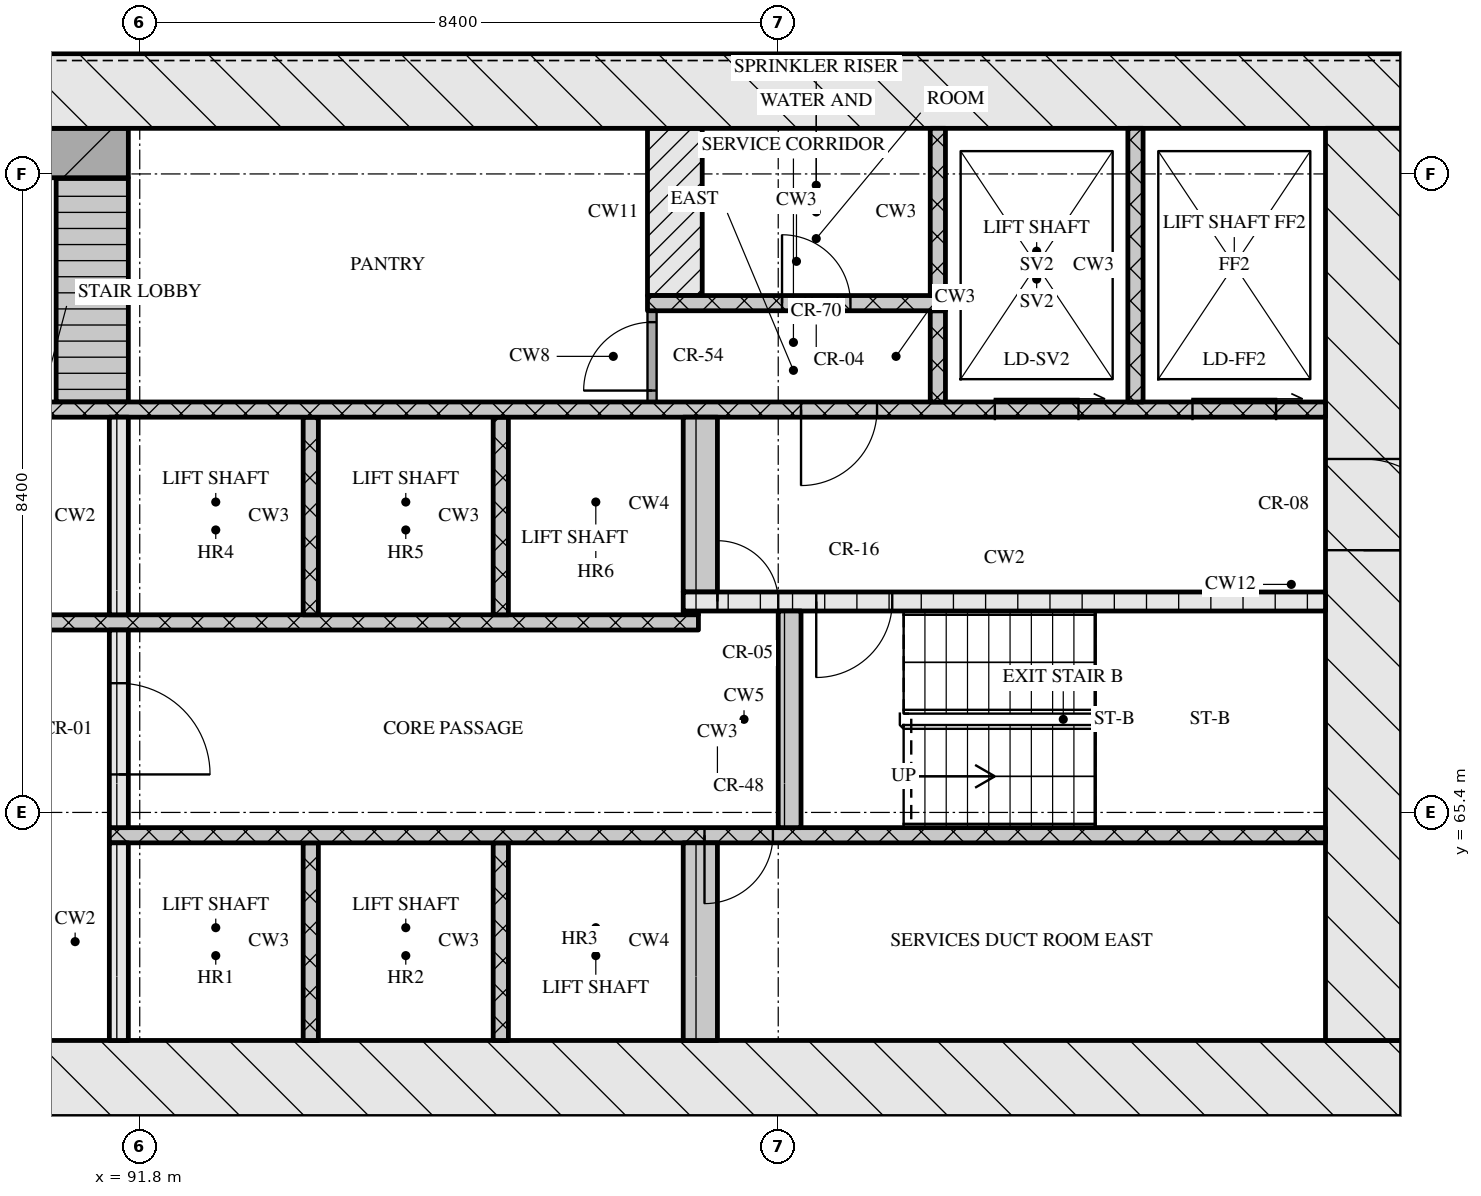
"""IFC4 building model, lengths in metres.
Left out: names, types, materials, properties, quantities, classifications, styles, units other than length and angle.
Written with IfcOpenShell. Run it as: python <this file> out.ifc"""

import sys

from ifc_helpers import new_model, si_unit, direction, frame, frame_2d, origin, place, context, subcontext, project, spatial, rectangle, extrude, element, fill, save


model = new_model("IFC4")
c1 = context("Model", 3, precision=1e-05, world=origin(), true_north=direction((0.0, 1.0)))
c2 = subcontext(c1, "Body", "Model", "MODEL_VIEW")
j1 = project(units=[si_unit("LENGTHUNIT", "METRE"), si_unit("PLANEANGLEUNIT", "RADIAN")], contexts=[c1])
p1 = place(None, origin())
s1 = spatial("IfcSite", under=j1, at=p1, CompositionType="ELEMENT")
p2 = place(p1, origin())
s2 = spatial("IfcBuilding", under=s1, at=p2, CompositionType="ELEMENT")
p3 = place(p2, frame((0.0, 0.0, 131.25)))
s3 = spatial("IfcBuildingStorey", under=s2, at=p3, CompositionType="ELEMENT", Elevation=131.25)
p4 = place(p3, frame((66.8, 61.9, 0.0), z_axis=(0.0, 0.0, 1.0), x_axis=(1.0, 0.0, 0.0)))
e1 = element("IfcWall", 1, at=p4, inside=s3, PredefinedType="SOLIDWALL", context=c2, shape_type="SweptSolid", body=[
    extrude(rectangle(XDim=41.6, YDim=1.0, at=frame_2d((20.8, 0.0))), origin(), (0.0, 0.0, 1.0), 3.32),
])
p5 = place(p4, frame((21.15, 0.0, 0.0)))
e2 = element("IfcOpeningElement", 2, at=p5, cuts=e1, PredefinedType="OPENING", context=c2, shape_type="SweptSolid", body=[
    extrude(rectangle(XDim=1.8, YDim=2.1, at=frame_2d((0.9, 1.05))), frame((0.0, 0.51, 0.0), z_axis=(0.0, -1.0, 0.0), x_axis=(1.0, 0.0, 0.0)), (0.0, 0.0, 1.0), 1.02),
])
p6 = place(p3, frame((66.8, 74.9, 0.0), z_axis=(0.0, 0.0, 1.0), x_axis=(1.0, 0.0, 0.0)))
e3 = element("IfcWall", 3, at=p6, inside=s3, PredefinedType="SOLIDWALL", context=c2, shape_type="SweptSolid", body=[
    extrude(rectangle(XDim=41.6, YDim=1.0, at=frame_2d((20.8, 0.0))), origin(), (0.0, 0.0, 1.0), 3.32),
])
p7 = place(p3, frame((107.9, 62.4, 0.0), z_axis=(0.0, 0.0, 1.0), x_axis=(0.0, 1.0, 0.0)))
e4 = element("IfcWall", 4, at=p7, inside=s3, PredefinedType="SOLIDWALL", context=c2, shape_type="SweptSolid", body=[
    extrude(rectangle(XDim=12.0, YDim=1.0, at=frame_2d((6.0, 0.0))), origin(), (0.0, 0.0, 1.0), 3.32),
])
p8 = place(p7, frame((6.45, 0.0, 0.0)))
e5 = element("IfcOpeningElement", 5, at=p8, cuts=e4, PredefinedType="OPENING", context=c2, shape_type="SweptSolid", body=[
    extrude(rectangle(XDim=1.2, YDim=2.1, at=frame_2d((0.6, 1.05))), frame((0.0, 0.51, 0.0), z_axis=(0.0, -1.0, 0.0), x_axis=(1.0, 0.0, 0.0)), (0.0, 0.0, 1.0), 1.02),
])
p9 = place(p3, frame((91.525, 62.4, 0.0), z_axis=(0.0, 0.0, 1.0), x_axis=(0.0, 1.0, 0.0)))
e6 = element("IfcWall", 6, at=p9, inside=s3, PredefinedType="SOLIDWALL", context=c2, shape_type="SweptSolid", body=[
    extrude(rectangle(XDim=2.6, YDim=0.25, at=frame_2d((1.3, 0.0))), origin(), (0.0, 0.0, 1.0), 3.32),
])
for number, where, z_axis, x_axis in (
    (7, (94.05, 62.4, 0.0), (0.0, 0.0, 1.0), (0.0, 1.0, 0.0)),
    (8, (96.55, 62.4, 0.0), (0.0, 0.0, 1.0), (0.0, 1.0, 0.0)),
):
    element("IfcWall", number, at=place(p3, frame(where, z_axis=z_axis, x_axis=x_axis)), inside=s3, PredefinedType="SOLIDWALL", context=c2, shape_type="SweptSolid", body=[
        extrude(rectangle(XDim=2.6, YDim=0.2, at=frame_2d((1.3, 0.0))), origin(), (0.0, 0.0, 1.0), 3.32),
    ])
p10 = place(p3, frame((99.175, 62.4, 0.0), z_axis=(0.0, 0.0, 1.0), x_axis=(0.0, 1.0, 0.0)))
e9 = element("IfcWall", 9, at=p10, inside=s3, PredefinedType="SOLIDWALL", context=c2, shape_type="SweptSolid", body=[
    extrude(rectangle(XDim=2.6, YDim=0.45, at=frame_2d((1.3, 0.0))), origin(), (0.0, 0.0, 1.0), 3.32),
])
p11 = place(p3, frame((91.4, 65.1, 0.0), z_axis=(0.0, 0.0, 1.0), x_axis=(1.0, 0.0, 0.0)))
e10 = element("IfcWall", 10, at=p11, inside=s3, PredefinedType="SOLIDWALL", context=c2, shape_type="SweptSolid", body=[
    extrude(rectangle(XDim=16.0, YDim=0.2, at=frame_2d((8.0, 0.0))), origin(), (0.0, 0.0, 1.0), 3.32),
])
p12 = place(p11, frame((7.83, 0.0, 0.0)))
e11 = element("IfcOpeningElement", 11, at=p12, cuts=e10, PredefinedType="OPENING", context=c2, shape_type="SweptSolid", body=[
    extrude(rectangle(XDim=0.9, YDim=2.1, at=frame_2d((0.45, 1.05))), frame((0.0, 0.11, 0.0), z_axis=(0.0, -1.0, 0.0), x_axis=(1.0, 0.0, 0.0)), (0.0, 0.0, 1.0), 0.22),
])
p13 = place(p3, frame((91.525, 65.2, 0.0), z_axis=(0.0, 0.0, 1.0), x_axis=(0.0, 1.0, 0.0)))
e12 = element("IfcWall", 12, at=p13, inside=s3, PredefinedType="SOLIDWALL", context=c2, shape_type="SweptSolid", body=[
    extrude(rectangle(XDim=2.6, YDim=0.25, at=frame_2d((1.3, 0.0))), origin(), (0.0, 0.0, 1.0), 3.32),
])
p14 = place(p13, frame((0.7, 0.0, 0.0)))
e13 = element("IfcOpeningElement", 13, at=p14, cuts=e12, PredefinedType="OPENING", context=c2, shape_type="SweptSolid", body=[
    extrude(rectangle(XDim=1.2, YDim=2.1, at=frame_2d((0.6, 1.05))), frame((0.0, 0.135, 0.0), z_axis=(0.0, -1.0, 0.0), x_axis=(1.0, 0.0, 0.0)), (0.0, 0.0, 1.0), 0.27),
])
p15 = place(p3, frame((100.35, 65.2, 0.0), z_axis=(0.0, 0.0, 1.0), x_axis=(0.0, 1.0, 0.0)))
e14 = element("IfcWall", 14, at=p15, inside=s3, PredefinedType="SOLIDWALL", context=c2, shape_type="SweptSolid", body=[
    extrude(rectangle(XDim=2.85, YDim=0.3, at=frame_2d((1.425, 0.0))), origin(), (0.0, 0.0, 1.0), 3.32),
])
p16 = place(p3, frame((76.05, 67.9, 0.0), z_axis=(0.0, 0.0, 1.0), x_axis=(1.0, 0.0, 0.0)))
e15 = element("IfcWall", 15, at=p16, inside=s3, PredefinedType="SOLIDWALL", context=c2, shape_type="SweptSolid", body=[
    extrude(rectangle(XDim=23.1, YDim=0.2, at=frame_2d((11.55, 0.0))), origin(), (0.0, 0.0, 1.0), 3.32),
])
p17 = place(p16, frame((0.6, 0.0, 0.0)))
e16 = element("IfcOpeningElement", 16, at=p17, cuts=e15, PredefinedType="OPENING", context=c2, shape_type="SweptSolid", body=[
    extrude(rectangle(XDim=1.1, YDim=2.1, at=frame_2d((0.55, 1.05))), frame((0.0, 0.11, 0.0), z_axis=(0.0, -1.0, 0.0), x_axis=(1.0, 0.0, 0.0)), (0.0, 0.0, 1.0), 0.22),
])
p18 = place(p16, frame((3.1, 0.0, 0.0)))
e17 = element("IfcOpeningElement", 17, at=p18, cuts=e15, PredefinedType="OPENING", context=c2, shape_type="SweptSolid", body=[
    extrude(rectangle(XDim=1.1, YDim=2.1, at=frame_2d((0.55, 1.05))), frame((0.0, 0.11, 0.0), z_axis=(0.0, -1.0, 0.0), x_axis=(1.0, 0.0, 0.0)), (0.0, 0.0, 1.0), 0.22),
])
p19 = place(p16, frame((5.6, 0.0, 0.0)))
e18 = element("IfcOpeningElement", 18, at=p19, cuts=e15, PredefinedType="OPENING", context=c2, shape_type="SweptSolid", body=[
    extrude(rectangle(XDim=1.1, YDim=2.1, at=frame_2d((0.55, 1.05))), frame((0.0, 0.11, 0.0), z_axis=(0.0, -1.0, 0.0), x_axis=(1.0, 0.0, 0.0)), (0.0, 0.0, 1.0), 0.22),
])
p20 = place(p16, frame((8.45, 0.0, 0.0)))
e19 = element("IfcOpeningElement", 19, at=p20, cuts=e15, PredefinedType="OPENING", context=c2, shape_type="SweptSolid", body=[
    extrude(rectangle(XDim=0.9, YDim=2.1, at=frame_2d((0.45, 1.05))), frame((0.0, 0.11, 0.0), z_axis=(0.0, -1.0, 0.0), x_axis=(1.0, 0.0, 0.0)), (0.0, 0.0, 1.0), 0.22),
])
p21 = place(p16, frame((10.91, 0.0, 0.0)))
e20 = element("IfcOpeningElement", 20, at=p21, cuts=e15, PredefinedType="OPENING", context=c2, shape_type="SweptSolid", body=[
    extrude(rectangle(XDim=0.9, YDim=2.1, at=frame_2d((0.45, 1.05))), frame((0.0, 0.11, 0.0), z_axis=(0.0, -1.0, 0.0), x_axis=(1.0, 0.0, 0.0)), (0.0, 0.0, 1.0), 0.22),
])
p22 = place(p16, frame((13.55, 0.0, 0.0)))
e21 = element("IfcOpeningElement", 21, at=p22, cuts=e15, PredefinedType="OPENING", context=c2, shape_type="SweptSolid", body=[
    extrude(rectangle(XDim=1.0, YDim=2.1, at=frame_2d((0.5, 1.05))), frame((0.0, 0.11, 0.0), z_axis=(0.0, -1.0, 0.0), x_axis=(1.0, 0.0, 0.0)), (0.0, 0.0, 1.0), 0.22),
])
p23 = place(p3, frame((91.525, 68.0, 0.0), z_axis=(0.0, 0.0, 1.0), x_axis=(0.0, 1.0, 0.0)))
e22 = element("IfcWall", 22, at=p23, inside=s3, PredefinedType="SOLIDWALL", context=c2, shape_type="SweptSolid", body=[
    extrude(rectangle(XDim=2.6, YDim=0.25, at=frame_2d((1.3, 0.0))), origin(), (0.0, 0.0, 1.0), 3.32),
])
for number, where, z_axis, x_axis in (
    (23, (94.05, 68.0, 0.0), (0.0, 0.0, 1.0), (0.0, 1.0, 0.0)),
    (24, (96.55, 68.0, 0.0), (0.0, 0.0, 1.0), (0.0, 1.0, 0.0)),
):
    element("IfcWall", number, at=place(p3, frame(where, z_axis=z_axis, x_axis=x_axis)), inside=s3, PredefinedType="SOLIDWALL", context=c2, shape_type="SweptSolid", body=[
        extrude(rectangle(XDim=2.6, YDim=0.2, at=frame_2d((1.3, 0.0))), origin(), (0.0, 0.0, 1.0), 3.32),
    ])
p24 = place(p3, frame((98.95, 68.025, 0.0), z_axis=(0.0, 0.0, 1.0), x_axis=(1.0, 0.0, 0.0)))
e25 = element("IfcWall", 25, at=p24, inside=s3, PredefinedType="SOLIDWALL", context=c2, shape_type="SweptSolid", body=[
    extrude(rectangle(XDim=0.2, YDim=0.05, at=frame_2d((0.1, 0.0))), origin(), (0.0, 0.0, 1.0), 3.32),
])
p25 = place(p3, frame((98.95, 68.175, 0.0), z_axis=(0.0, 0.0, 1.0), x_axis=(1.0, 0.0, 0.0)))
e26 = element("IfcWall", 26, at=p25, inside=s3, PredefinedType="SOLIDWALL", context=c2, shape_type="SweptSolid", body=[
    extrude(rectangle(XDim=8.45, YDim=0.25, at=frame_2d((4.225, 0.0))), origin(), (0.0, 0.0, 1.0), 3.32),
])
p26 = place(p25, frame((0.45, 0.0, 0.0)))
e27 = element("IfcOpeningElement", 27, at=p26, cuts=e26, PredefinedType="OPENING", context=c2, shape_type="SweptSolid", body=[
    extrude(rectangle(XDim=0.8, YDim=2.1, at=frame_2d((0.4, 1.05))), frame((0.0, 0.135, 0.0), z_axis=(0.0, -1.0, 0.0), x_axis=(1.0, 0.0, 0.0)), (0.0, 0.0, 1.0), 0.27),
])
p27 = place(p25, frame((1.75, 0.0, 0.0)))
e28 = element("IfcOpeningElement", 28, at=p27, cuts=e26, PredefinedType="OPENING", context=c2, shape_type="SweptSolid", body=[
    extrude(rectangle(XDim=1.0, YDim=2.1, at=frame_2d((0.5, 1.05))), frame((0.0, 0.135, 0.0), z_axis=(0.0, -1.0, 0.0), x_axis=(1.0, 0.0, 0.0)), (0.0, 0.0, 1.0), 0.27),
])
p28 = place(p3, frame((99.175, 68.3, 0.0), z_axis=(0.0, 0.0, 1.0), x_axis=(0.0, 1.0, 0.0)))
e29 = element("IfcWall", 29, at=p28, inside=s3, PredefinedType="SOLIDWALL", context=c2, shape_type="SweptSolid", body=[
    extrude(rectangle(XDim=2.3, YDim=0.45, at=frame_2d((1.15, 0.0))), origin(), (0.0, 0.0, 1.0), 3.32),
])
p29 = place(p3, frame((67.8, 70.7, 0.0), z_axis=(0.0, 0.0, 1.0), x_axis=(1.0, 0.0, 0.0)))
e30 = element("IfcWall", 30, at=p29, inside=s3, PredefinedType="SOLIDWALL", context=c2, shape_type="SweptSolid", body=[
    extrude(rectangle(XDim=39.6, YDim=0.2, at=frame_2d((19.8, 0.0))), origin(), (0.0, 0.0, 1.0), 3.32),
])
p30 = place(p29, frame((0.65, 0.0, 0.0)))
e31 = element("IfcOpeningElement", 31, at=p30, cuts=e30, PredefinedType="OPENING", context=c2, shape_type="SweptSolid", body=[
    extrude(rectangle(XDim=1.1, YDim=2.1, at=frame_2d((0.55, 1.05))), frame((0.0, 0.11, 0.0), z_axis=(0.0, -1.0, 0.0), x_axis=(1.0, 0.0, 0.0)), (0.0, 0.0, 1.0), 0.22),
])
p31 = place(p29, frame((3.25, 0.0, 0.0)))
e32 = element("IfcOpeningElement", 32, at=p31, cuts=e30, PredefinedType="OPENING", context=c2, shape_type="SweptSolid", body=[
    extrude(rectangle(XDim=1.1, YDim=2.1, at=frame_2d((0.55, 1.05))), frame((0.0, 0.11, 0.0), z_axis=(0.0, -1.0, 0.0), x_axis=(1.0, 0.0, 0.0)), (0.0, 0.0, 1.0), 0.22),
])
p32 = place(p29, frame((5.9, 0.0, 0.0)))
e33 = element("IfcOpeningElement", 33, at=p32, cuts=e30, PredefinedType="OPENING", context=c2, shape_type="SweptSolid", body=[
    extrude(rectangle(XDim=1.0, YDim=2.1, at=frame_2d((0.5, 1.05))), frame((0.0, 0.11, 0.0), z_axis=(0.0, -1.0, 0.0), x_axis=(1.0, 0.0, 0.0)), (0.0, 0.0, 1.0), 0.22),
])
p33 = place(p29, frame((21.7, 0.0, 0.0)))
e34 = element("IfcOpeningElement", 34, at=p33, cuts=e30, PredefinedType="OPENING", context=c2, shape_type="SweptSolid", body=[
    extrude(rectangle(XDim=1.0, YDim=2.1, at=frame_2d((0.5, 1.05))), frame((0.0, 0.11, 0.0), z_axis=(0.0, -1.0, 0.0), x_axis=(1.0, 0.0, 0.0)), (0.0, 0.0, 1.0), 0.22),
])
p34 = place(p29, frame((32.7, 0.0, 0.0)))
e35 = element("IfcOpeningElement", 35, at=p34, cuts=e30, PredefinedType="OPENING", context=c2, shape_type="SweptSolid", body=[
    extrude(rectangle(XDim=1.0, YDim=2.1, at=frame_2d((0.5, 1.05))), frame((0.0, 0.11, 0.0), z_axis=(0.0, -1.0, 0.0), x_axis=(1.0, 0.0, 0.0)), (0.0, 0.0, 1.0), 0.22),
])
p35 = place(p29, frame((35.25, 0.0, 0.0)))
e36 = element("IfcOpeningElement", 36, at=p35, cuts=e30, PredefinedType="OPENING", context=c2, shape_type="SweptSolid", body=[
    extrude(rectangle(XDim=1.1, YDim=2.1, at=frame_2d((0.55, 1.05))), frame((0.0, 0.11, 0.0), z_axis=(0.0, -1.0, 0.0), x_axis=(1.0, 0.0, 0.0)), (0.0, 0.0, 1.0), 0.22),
])
p36 = place(p29, frame((37.85, 0.0, 0.0)))
e37 = element("IfcOpeningElement", 37, at=p36, cuts=e30, PredefinedType="OPENING", context=c2, shape_type="SweptSolid", body=[
    extrude(rectangle(XDim=1.1, YDim=2.1, at=frame_2d((0.55, 1.05))), frame((0.0, 0.11, 0.0), z_axis=(0.0, -1.0, 0.0), x_axis=(1.0, 0.0, 0.0)), (0.0, 0.0, 1.0), 0.22),
])
p37 = place(p3, frame((91.175, 70.8, 0.0), z_axis=(0.0, 0.0, 1.0), x_axis=(0.0, 1.0, 0.0)))
e38 = element("IfcWall", 38, at=p37, inside=s3, PredefinedType="SOLIDWALL", context=c2, shape_type="SweptSolid", body=[
    extrude(rectangle(XDim=2.95, YDim=0.95, at=frame_2d((1.475, 0.0))), origin(), (0.0, 0.0, 1.0), 3.32),
])
p38 = place(p3, frame((98.54, 70.8, 0.0), z_axis=(0.0, 0.0, 1.0), x_axis=(0.0, 1.0, 0.0)))
e39 = element("IfcWall", 39, at=p38, inside=s3, PredefinedType="PARTITIONING", context=c2, shape_type="SweptSolid", body=[
    extrude(rectangle(XDim=1.2, YDim=0.12, at=frame_2d((0.6, 0.0))), origin(), (0.0, 0.0, 1.0), 3.32),
])
p39 = place(p38, frame((0.15, 0.0, 0.0)))
e40 = element("IfcOpeningElement", 40, at=p39, cuts=e39, PredefinedType="OPENING", context=c2, shape_type="SweptSolid", body=[
    extrude(rectangle(XDim=0.9, YDim=2.1, at=frame_2d((0.45, 1.05))), frame((0.0, 0.07, 0.0), z_axis=(0.0, -1.0, 0.0), x_axis=(1.0, 0.0, 0.0)), (0.0, 0.0, 1.0), 0.14),
])
p40 = place(p3, frame((102.3, 70.8, 0.0), z_axis=(0.0, 0.0, 1.0), x_axis=(0.0, 1.0, 0.0)))
e41 = element("IfcWall", 41, at=p40, inside=s3, PredefinedType="SOLIDWALL", context=c2, shape_type="SweptSolid", body=[
    extrude(rectangle(XDim=1.2, YDim=0.2, at=frame_2d((0.6, 0.0))), origin(), (0.0, 0.0, 1.0), 3.32),
])
p41 = place(p3, frame((104.9, 70.8, 0.0), z_axis=(0.0, 0.0, 1.0), x_axis=(0.0, 1.0, 0.0)))
e42 = element("IfcWall", 42, at=p41, inside=s3, PredefinedType="SOLIDWALL", context=c2, shape_type="SweptSolid", body=[
    extrude(rectangle(XDim=3.6, YDim=0.2, at=frame_2d((1.8, 0.0))), origin(), (0.0, 0.0, 1.0), 3.32),
])
p42 = place(p3, frame((98.48, 72.1, 0.0), z_axis=(0.0, 0.0, 1.0), x_axis=(1.0, 0.0, 0.0)))
e43 = element("IfcWall", 43, at=p42, inside=s3, PredefinedType="SOLIDWALL", context=c2, shape_type="SweptSolid", body=[
    extrude(rectangle(XDim=3.92, YDim=0.2, at=frame_2d((1.96, 0.0))), origin(), (0.0, 0.0, 1.0), 3.32),
])
p43 = place(p42, frame((1.77, 0.0, 0.0)))
e44 = element("IfcOpeningElement", 44, at=p43, cuts=e43, PredefinedType="OPENING", context=c2, shape_type="SweptSolid", body=[
    extrude(rectangle(XDim=0.9, YDim=2.1, at=frame_2d((0.45, 1.05))), frame((0.0, 0.11, 0.0), z_axis=(0.0, -1.0, 0.0), x_axis=(1.0, 0.0, 0.0)), (0.0, 0.0, 1.0), 0.22),
])
p44 = place(p3, frame((98.84, 72.2, 0.0), z_axis=(0.0, 0.0, 1.0), x_axis=(0.0, 1.0, 0.0)))
e45 = element("IfcWall", 45, at=p44, inside=s3, PredefinedType="SOLIDWALL", context=c2, shape_type="SweptSolid", body=[
    extrude(rectangle(XDim=2.2, YDim=0.72, at=frame_2d((1.1, 0.0))), origin(), (0.0, 0.0, 1.0), 3.32),
])
p45 = place(p3, frame((102.3, 72.2, 0.0), z_axis=(0.0, 0.0, 1.0), x_axis=(0.0, 1.0, 0.0)))
e46 = element("IfcWall", 46, at=p45, inside=s3, PredefinedType="SOLIDWALL", context=c2, shape_type="SweptSolid", body=[
    extrude(rectangle(XDim=2.2, YDim=0.2, at=frame_2d((1.1, 0.0))), origin(), (0.0, 0.0, 1.0), 3.32),
])
p46 = place(p3, frame((83.55, 74.075, 0.0), z_axis=(0.0, 0.0, 1.0), x_axis=(1.0, 0.0, 0.0)))
e47 = element("IfcWall", 47, at=p46, inside=s3, PredefinedType="SOLIDWALL", context=c2, shape_type="SweptSolid", body=[
    extrude(rectangle(XDim=8.1, YDim=0.65, at=frame_2d((4.05, 0.0))), origin(), (0.0, 0.0, 1.0), 3.32),
])
p47 = place(p12, origin())
e48 = element("IfcDoor", 48, at=p47, inside=s3, OperationType="SINGLE_SWING_RIGHT", PredefinedType="DOOR", context=c2, shape_type="SweptSolid", body=[
    extrude(rectangle(XDim=0.9, YDim=2.1, at=frame_2d((0.45, 1.05))), frame((0.0, 0.025, 0.0), z_axis=(0.0, -1.0, 0.0), x_axis=(1.0, 0.0, 0.0)), (0.0, 0.0, 1.0), 0.05),
])
fill(e11, e48)
p48 = place(p14, origin())
e49 = element("IfcDoor", 49, at=p48, inside=s3, OperationType="SINGLE_SWING_RIGHT", PredefinedType="DOOR", context=c2, shape_type="SweptSolid", body=[
    extrude(rectangle(XDim=1.2, YDim=2.1, at=frame_2d((0.6, 1.05))), frame((0.0, 0.025, 0.0), z_axis=(0.0, -1.0, 0.0), x_axis=(1.0, 0.0, 0.0)), (0.0, 0.0, 1.0), 0.05),
])
fill(e13, e49)
p49 = place(p26, origin())
e50 = element("IfcDoor", 50, at=p49, inside=s3, OperationType="SINGLE_SWING_LEFT", PredefinedType="DOOR", context=c2, shape_type="SweptSolid", body=[
    extrude(rectangle(XDim=0.8, YDim=2.1, at=frame_2d((0.4, 1.05))), frame((0.0, 0.025, 0.0), z_axis=(0.0, -1.0, 0.0), x_axis=(1.0, 0.0, 0.0)), (0.0, 0.0, 1.0), 0.05),
])
fill(e27, e50)
p50 = place(p27, origin())
e51 = element("IfcDoor", 51, at=p50, inside=s3, OperationType="SINGLE_SWING_RIGHT", PredefinedType="DOOR", context=c2, shape_type="SweptSolid", body=[
    extrude(rectangle(XDim=1.0, YDim=2.1, at=frame_2d((0.5, 1.05))), frame((0.0, 0.025, 0.0), z_axis=(0.0, -1.0, 0.0), x_axis=(1.0, 0.0, 0.0)), (0.0, 0.0, 1.0), 0.05),
])
fill(e28, e51)
p51 = place(p8, origin())
e52 = element("IfcDoor", 52, at=p51, inside=s3, OperationType="SINGLE_SWING_RIGHT", PredefinedType="DOOR", context=c2, shape_type="SweptSolid", body=[
    extrude(rectangle(XDim=1.2, YDim=2.1, at=frame_2d((0.6, 1.05))), frame((0.0, 0.025, 0.0), z_axis=(0.0, -1.0, 0.0), x_axis=(1.0, 0.0, 0.0)), (0.0, 0.0, 1.0), 0.05),
])
fill(e5, e52)
p52 = place(p34, origin())
e53 = element("IfcDoor", 53, at=p52, inside=s3, OperationType="SINGLE_SWING_RIGHT", PredefinedType="DOOR", context=c2, shape_type="SweptSolid", body=[
    extrude(rectangle(XDim=1.0, YDim=2.1, at=frame_2d((0.5, 1.05))), frame((0.0, 0.025, 0.0), z_axis=(0.0, -1.0, 0.0), x_axis=(1.0, 0.0, 0.0)), (0.0, 0.0, 1.0), 0.05),
])
fill(e35, e53)
p53 = place(p35, origin())
e54 = element("IfcDoor", 54, at=p53, inside=s3, OperationType="SLIDING_TO_RIGHT", PredefinedType="DOOR", context=c2, shape_type="SweptSolid", body=[
    extrude(rectangle(XDim=1.1, YDim=2.1, at=frame_2d((0.55, 1.05))), frame((0.0, 0.025, 0.0), z_axis=(0.0, -1.0, 0.0), x_axis=(1.0, 0.0, 0.0)), (0.0, 0.0, 1.0), 0.05),
])
fill(e36, e54)
p54 = place(p36, origin())
e55 = element("IfcDoor", 55, at=p54, inside=s3, OperationType="SLIDING_TO_RIGHT", PredefinedType="DOOR", context=c2, shape_type="SweptSolid", body=[
    extrude(rectangle(XDim=1.1, YDim=2.1, at=frame_2d((0.55, 1.05))), frame((0.0, 0.025, 0.0), z_axis=(0.0, -1.0, 0.0), x_axis=(1.0, 0.0, 0.0)), (0.0, 0.0, 1.0), 0.05),
])
fill(e37, e55)
p55 = place(p39, origin())
e56 = element("IfcDoor", 56, at=p55, inside=s3, OperationType="SINGLE_SWING_LEFT", PredefinedType="DOOR", context=c2, shape_type="SweptSolid", body=[
    extrude(rectangle(XDim=0.9, YDim=2.1, at=frame_2d((0.45, 1.05))), frame((0.0, 0.025, 0.0), z_axis=(0.0, -1.0, 0.0), x_axis=(1.0, 0.0, 0.0)), (0.0, 0.0, 1.0), 0.05),
])
fill(e40, e56)
p56 = place(p43, origin())
e57 = element("IfcDoor", 57, at=p56, inside=s3, OperationType="SINGLE_SWING_LEFT", PredefinedType="DOOR", context=c2, shape_type="SweptSolid", body=[
    extrude(rectangle(XDim=0.9, YDim=2.1, at=frame_2d((0.45, 1.05))), frame((0.0, 0.025, 0.0), z_axis=(0.0, -1.0, 0.0), x_axis=(1.0, 0.0, 0.0)), (0.0, 0.0, 1.0), 0.05),
])
fill(e44, e57)
save(model, sys.argv[1])
